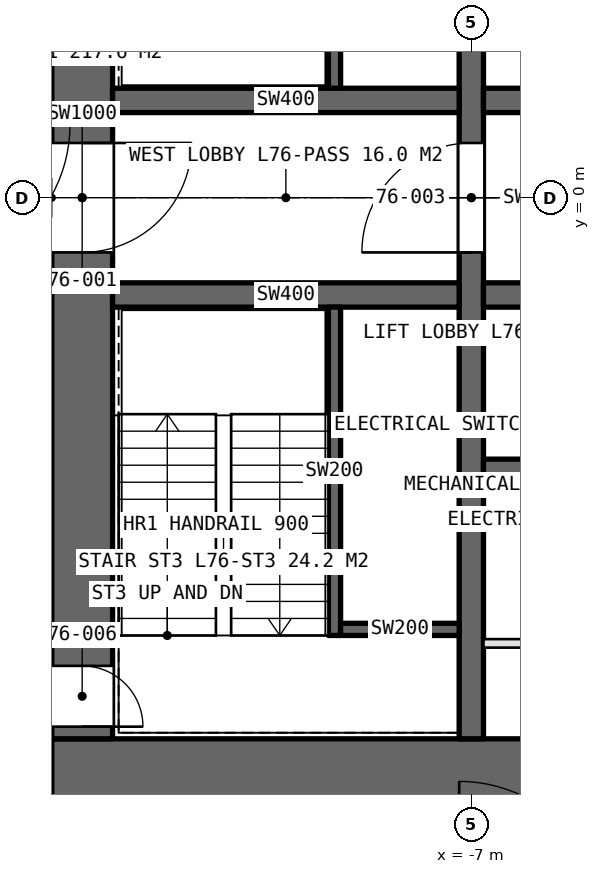
"""IFC4 building model, lengths in metres.
Left out: names, types, materials, properties, quantities, classifications, styles, units other than length and angle.
Written with IfcOpenShell. Run it as: python <this file> out.ifc"""

import sys

from ifc_helpers import new_model, si_unit, direction, frame, frame_2d, origin, place, context, subcontext, project, spatial, rectangle, extrude, element, fill, save


model = new_model("IFC4")
c1 = context("Model", 3, precision=1e-05, world=origin(), true_north=direction((0.0, 1.0)))
c2 = subcontext(c1, "Body", "Model", "MODEL_VIEW")
j1 = project(units=[si_unit("LENGTHUNIT", "METRE"), si_unit("PLANEANGLEUNIT", "RADIAN")], contexts=[c1])
p1 = place(None, origin())
s1 = spatial("IfcSite", under=j1, at=p1, CompositionType="ELEMENT")
p2 = place(p1, origin())
s2 = spatial("IfcBuilding", under=s1, at=p2, CompositionType="ELEMENT")
p3 = place(p2, frame((0.0, 0.0, 339.2)))
s3 = spatial("IfcBuildingStorey", under=s2, at=p3, CompositionType="ELEMENT", Elevation=339.2)
p4 = place(p3, frame((-13.9, -9.4, 0.0), z_axis=(0.0, 0.0, 1.0), x_axis=(1.0, 0.0, 0.0)))
e1 = element("IfcWall", 1, at=p4, inside=s3, PredefinedType="SHEAR", context=c2, shape_type="SweptSolid", body=[
    extrude(rectangle(XDim=27.8, YDim=1.0, at=frame_2d((13.9, 0.0))), origin(), (0.0, 0.0, 1.0), 5.0),
])
p5 = place(p4, frame((13.0, 0.0, 0.0)))
e2 = element("IfcOpeningElement", 2, at=p5, cuts=e1, PredefinedType="OPENING", context=c2, shape_type="SweptSolid", body=[
    extrude(rectangle(XDim=1.8, YDim=2.4, at=frame_2d((0.9, 1.2))), frame((0.0, 0.51, 0.0), z_axis=(0.0, -1.0, 0.0), x_axis=(1.0, 0.0, 0.0)), (0.0, 0.0, 1.0), 1.02),
])
p6 = place(p4, frame((22.95, 0.0, 0.0)))
e3 = element("IfcOpeningElement", 3, at=p6, cuts=e1, PredefinedType="OPENING", context=c2, shape_type="SweptSolid", body=[
    extrude(rectangle(XDim=2.2, YDim=2.7, at=frame_2d((1.1, 1.35))), frame((0.0, 0.51, 0.0), z_axis=(0.0, -1.0, 0.0), x_axis=(1.0, 0.0, 0.0)), (0.0, 0.0, 1.0), 1.02),
])
p7 = place(p3, frame((-13.4, 8.9, 0.0), z_axis=(0.0, 0.0, 1.0), x_axis=(0.0, -1.0, 0.0)))
e4 = element("IfcWall", 4, at=p7, inside=s3, PredefinedType="SHEAR", context=c2, shape_type="SweptSolid", body=[
    extrude(rectangle(XDim=17.8, YDim=1.0, at=frame_2d((8.9, 0.0))), origin(), (0.0, 0.0, 1.0), 5.0),
])
p8 = place(p7, frame((8.0, 0.0, 0.0)))
e5 = element("IfcOpeningElement", 5, at=p8, cuts=e4, PredefinedType="OPENING", context=c2, shape_type="SweptSolid", body=[
    extrude(rectangle(XDim=1.8, YDim=2.4, at=frame_2d((0.9, 1.2))), frame((0.0, 0.51, 0.0), z_axis=(0.0, -1.0, 0.0), x_axis=(1.0, 0.0, 0.0)), (0.0, 0.0, 1.0), 1.02),
])
p9 = place(p7, frame((16.6, 0.0, 0.0)))
e6 = element("IfcOpeningElement", 6, at=p9, cuts=e4, PredefinedType="OPENING", context=c2, shape_type="SweptSolid", body=[
    extrude(rectangle(XDim=1.0, YDim=2.4, at=frame_2d((0.5, 1.2))), frame((0.0, 0.51, 0.0), z_axis=(0.0, -1.0, 0.0), x_axis=(1.0, 0.0, 0.0)), (0.0, 0.0, 1.0), 1.02),
])
p10 = place(p3, frame((-7.0, -8.9, 0.0), z_axis=(0.0, 0.0, 1.0), x_axis=(0.0, 1.0, 0.0)))
e7 = element("IfcWall", 7, at=p10, inside=s3, PredefinedType="SHEAR", context=c2, shape_type="SweptSolid", body=[
    extrude(rectangle(XDim=17.8, YDim=0.4, at=frame_2d((8.9, 0.0))), origin(), (0.0, 0.0, 1.0), 5.0),
])
p11 = place(p10, frame((8.0, 0.0, 0.0)))
e8 = element("IfcOpeningElement", 8, at=p11, cuts=e7, PredefinedType="OPENING", context=c2, shape_type="SweptSolid", body=[
    extrude(rectangle(XDim=1.8, YDim=2.4, at=frame_2d((0.9, 1.2))), frame((0.0, 0.21, 0.0), z_axis=(0.0, -1.0, 0.0), x_axis=(1.0, 0.0, 0.0)), (0.0, 0.0, 1.0), 0.42),
])
p12 = place(p3, frame((-6.8, 1.6, 0.0), z_axis=(0.0, 0.0, 1.0), x_axis=(1.0, 0.0, 0.0)))
e9 = element("IfcWall", 9, at=p12, inside=s3, PredefinedType="SHEAR", context=c2, shape_type="SweptSolid", body=[
    extrude(rectangle(XDim=13.6, YDim=0.4, at=frame_2d((6.8, 0.0))), origin(), (0.0, 0.0, 1.0), 5.0),
])
p13 = place(p12, frame((0.765, 0.0, 0.0)))
e10 = element("IfcOpeningElement", 10, at=p13, cuts=e9, PredefinedType="OPENING", context=c2, shape_type="SweptSolid", body=[
    extrude(rectangle(XDim=1.0, YDim=2.4, at=frame_2d((0.5, 1.2))), frame((0.0, 0.21, 0.0), z_axis=(0.0, -1.0, 0.0), x_axis=(1.0, 0.0, 0.0)), (0.0, 0.0, 1.0), 0.42),
])
p14 = place(p12, frame((3.5, 0.0, 0.0)))
e11 = element("IfcOpeningElement", 11, at=p14, cuts=e9, PredefinedType="OPENING", context=c2, shape_type="SweptSolid", body=[
    extrude(rectangle(XDim=1.0, YDim=2.4, at=frame_2d((0.5, 1.2))), frame((0.0, 0.21, 0.0), z_axis=(0.0, -1.0, 0.0), x_axis=(1.0, 0.0, 0.0)), (0.0, 0.0, 1.0), 0.42),
])
p15 = place(p12, frame((6.3, 0.0, 0.0)))
e12 = element("IfcOpeningElement", 12, at=p15, cuts=e9, PredefinedType="OPENING", context=c2, shape_type="SweptSolid", body=[
    extrude(rectangle(XDim=1.0, YDim=2.4, at=frame_2d((0.5, 1.2))), frame((0.0, 0.21, 0.0), z_axis=(0.0, -1.0, 0.0), x_axis=(1.0, 0.0, 0.0)), (0.0, 0.0, 1.0), 0.42),
])
p16 = place(p12, frame((9.035, 0.0, 0.0)))
e13 = element("IfcOpeningElement", 13, at=p16, cuts=e9, PredefinedType="OPENING", context=c2, shape_type="SweptSolid", body=[
    extrude(rectangle(XDim=1.0, YDim=2.4, at=frame_2d((0.5, 1.2))), frame((0.0, 0.21, 0.0), z_axis=(0.0, -1.0, 0.0), x_axis=(1.0, 0.0, 0.0)), (0.0, 0.0, 1.0), 0.42),
])
p17 = place(p12, frame((11.9, 0.0, 0.0)))
e14 = element("IfcOpeningElement", 14, at=p17, cuts=e9, PredefinedType="OPENING", context=c2, shape_type="SweptSolid", body=[
    extrude(rectangle(XDim=1.0, YDim=2.4, at=frame_2d((0.5, 1.2))), frame((0.0, 0.21, 0.0), z_axis=(0.0, -1.0, 0.0), x_axis=(1.0, 0.0, 0.0)), (0.0, 0.0, 1.0), 0.42),
])
p18 = place(p3, frame((-6.8, -1.6, 0.0), z_axis=(0.0, 0.0, 1.0), x_axis=(1.0, 0.0, 0.0)))
e15 = element("IfcWall", 15, at=p18, inside=s3, PredefinedType="SHEAR", context=c2, shape_type="SweptSolid", body=[
    extrude(rectangle(XDim=13.6, YDim=0.4, at=frame_2d((6.8, 0.0))), origin(), (0.0, 0.0, 1.0), 5.0),
])
p19 = place(p18, frame((0.765, 0.0, 0.0)))
e16 = element("IfcOpeningElement", 16, at=p19, cuts=e15, PredefinedType="OPENING", context=c2, shape_type="SweptSolid", body=[
    extrude(rectangle(XDim=1.0, YDim=2.4, at=frame_2d((0.5, 1.2))), frame((0.0, 0.21, 0.0), z_axis=(0.0, -1.0, 0.0), x_axis=(1.0, 0.0, 0.0)), (0.0, 0.0, 1.0), 0.42),
])
p20 = place(p18, frame((3.5, 0.0, 0.0)))
e17 = element("IfcOpeningElement", 17, at=p20, cuts=e15, PredefinedType="OPENING", context=c2, shape_type="SweptSolid", body=[
    extrude(rectangle(XDim=1.0, YDim=2.4, at=frame_2d((0.5, 1.2))), frame((0.0, 0.21, 0.0), z_axis=(0.0, -1.0, 0.0), x_axis=(1.0, 0.0, 0.0)), (0.0, 0.0, 1.0), 0.42),
])
p21 = place(p18, frame((6.3, 0.0, 0.0)))
e18 = element("IfcOpeningElement", 18, at=p21, cuts=e15, PredefinedType="OPENING", context=c2, shape_type="SweptSolid", body=[
    extrude(rectangle(XDim=1.0, YDim=2.4, at=frame_2d((0.5, 1.2))), frame((0.0, 0.21, 0.0), z_axis=(0.0, -1.0, 0.0), x_axis=(1.0, 0.0, 0.0)), (0.0, 0.0, 1.0), 0.42),
])
p22 = place(p18, frame((9.035, 0.0, 0.0)))
e19 = element("IfcOpeningElement", 19, at=p22, cuts=e15, PredefinedType="OPENING", context=c2, shape_type="SweptSolid", body=[
    extrude(rectangle(XDim=1.0, YDim=2.4, at=frame_2d((0.5, 1.2))), frame((0.0, 0.21, 0.0), z_axis=(0.0, -1.0, 0.0), x_axis=(1.0, 0.0, 0.0)), (0.0, 0.0, 1.0), 0.42),
])
p23 = place(p18, frame((11.9, 0.0, 0.0)))
e20 = element("IfcOpeningElement", 20, at=p23, cuts=e15, PredefinedType="OPENING", context=c2, shape_type="SweptSolid", body=[
    extrude(rectangle(XDim=1.0, YDim=2.4, at=frame_2d((0.5, 1.2))), frame((0.0, 0.21, 0.0), z_axis=(0.0, -1.0, 0.0), x_axis=(1.0, 0.0, 0.0)), (0.0, 0.0, 1.0), 0.42),
])
p24 = place(p3, frame((-6.8, -4.5, 0.0), z_axis=(0.0, 0.0, 1.0), x_axis=(1.0, 0.0, 0.0)))
e21 = element("IfcWall", 21, at=p24, inside=s3, PredefinedType="SHEAR", context=c2, shape_type="SweptSolid", body=[
    extrude(rectangle(XDim=13.6, YDim=0.4, at=frame_2d((6.8, 0.0))), origin(), (0.0, 0.0, 1.0), 5.0),
])
for number, where, z_axis, x_axis in (
    (22, (-12.9, 1.6, 0.0), (0.0, 0.0, 1.0), (1.0, 0.0, 0.0)),
    (23, (-12.9, -1.6, 0.0), (0.0, 0.0, 1.0), (1.0, 0.0, 0.0)),
):
    element("IfcWall", number, at=place(p3, frame(where, z_axis=z_axis, x_axis=x_axis)), inside=s3, PredefinedType="SHEAR", context=c2, shape_type="SweptSolid", body=[
        extrude(rectangle(XDim=5.7, YDim=0.4, at=frame_2d((2.85, 0.0))), origin(), (0.0, 0.0, 1.0), 5.0),
    ])
p25 = place(p3, frame((-6.8, -7.33, 0.0), z_axis=(0.0, 0.0, 1.0), x_axis=(1.0, 0.0, 0.0)))
e24 = element("IfcWall", 24, at=p25, inside=s3, PredefinedType="PARTITIONING", context=c2, shape_type="SweptSolid", body=[
    extrude(rectangle(XDim=13.6, YDim=0.14, at=frame_2d((6.8, 0.0))), origin(), (0.0, 0.0, 1.0), 4.75),
])
p26 = place(p25, frame((3.48, 0.0, 0.0)))
e25 = element("IfcOpeningElement", 25, at=p26, cuts=e24, PredefinedType="OPENING", context=c2, shape_type="SweptSolid", body=[
    extrude(rectangle(XDim=1.0, YDim=2.4, at=frame_2d((0.5, 1.2))), frame((0.0, 0.08, 0.0), z_axis=(0.0, -1.0, 0.0), x_axis=(1.0, 0.0, 0.0)), (0.0, 0.0, 1.0), 0.16),
])
p27 = place(p25, frame((7.98, 0.0, 0.0)))
e26 = element("IfcOpeningElement", 26, at=p27, cuts=e24, PredefinedType="OPENING", context=c2, shape_type="SweptSolid", body=[
    extrude(rectangle(XDim=1.0, YDim=2.4, at=frame_2d((0.5, 1.2))), frame((0.0, 0.08, 0.0), z_axis=(0.0, -1.0, 0.0), x_axis=(1.0, 0.0, 0.0)), (0.0, 0.0, 1.0), 0.16),
])
p28 = place(p25, frame((12.35, 0.0, 0.0)))
e27 = element("IfcOpeningElement", 27, at=p28, cuts=e24, PredefinedType="OPENING", context=c2, shape_type="SweptSolid", body=[
    extrude(rectangle(XDim=1.0, YDim=2.4, at=frame_2d((0.5, 1.2))), frame((0.0, 0.08, 0.0), z_axis=(0.0, -1.0, 0.0), x_axis=(1.0, 0.0, 0.0)), (0.0, 0.0, 1.0), 0.16),
])
for number, where, z_axis, x_axis in (
    (28, (-9.25, 7.2, 0.0), (0.0, 0.0, 1.0), (0.0, -1.0, 0.0)),
    (29, (-9.25, -7.2, 0.0), (0.0, 0.0, 1.0), (0.0, 1.0, 0.0)),
):
    element("IfcWall", number, at=place(p3, frame(where, z_axis=z_axis, x_axis=x_axis)), inside=s3, PredefinedType="SOLIDWALL", context=c2, shape_type="SweptSolid", body=[
        extrude(rectangle(XDim=5.4, YDim=0.2, at=frame_2d((2.7, 0.0))), origin(), (0.0, 0.0, 1.0), 5.0),
    ])
p29 = place(p3, frame((-9.15, -7.1, 0.0), z_axis=(0.0, 0.0, 1.0), x_axis=(1.0, 0.0, 0.0)))
e30 = element("IfcWall", 30, at=p29, inside=s3, PredefinedType="SOLIDWALL", context=c2, shape_type="SweptSolid", body=[
    extrude(rectangle(XDim=1.95, YDim=0.2, at=frame_2d((0.975, 0.0))), origin(), (0.0, 0.0, 1.0), 5.0),
])
p30 = place(p8, origin())
e31 = element("IfcDoor", 31, at=p30, inside=s3, OperationType="DOUBLE_DOOR_SINGLE_SWING", PredefinedType="DOOR", context=c2, shape_type="SweptSolid", body=[
    extrude(rectangle(XDim=1.8, YDim=2.4, at=frame_2d((0.9, 1.2))), frame((0.0, 0.025, 0.0), z_axis=(0.0, -1.0, 0.0), x_axis=(1.0, 0.0, 0.0)), (0.0, 0.0, 1.0), 0.05),
])
fill(e5, e31)
p31 = place(p11, origin())
e32 = element("IfcDoor", 32, at=p31, inside=s3, OperationType="DOUBLE_DOOR_SINGLE_SWING", PredefinedType="DOOR", context=c2, shape_type="SweptSolid", body=[
    extrude(rectangle(XDim=1.8, YDim=2.4, at=frame_2d((0.9, 1.2))), frame((0.0, 0.025, 0.0), z_axis=(0.0, -1.0, 0.0), x_axis=(1.0, 0.0, 0.0)), (0.0, 0.0, 1.0), 0.05),
])
fill(e8, e32)
p32 = place(p9, origin())
e33 = element("IfcDoor", 33, at=p32, inside=s3, OperationType="SINGLE_SWING_RIGHT", PredefinedType="DOOR", context=c2, shape_type="SweptSolid", body=[
    extrude(rectangle(XDim=1.0, YDim=2.4, at=frame_2d((0.5, 1.2))), frame((0.0, 0.025, 0.0), z_axis=(0.0, -1.0, 0.0), x_axis=(1.0, 0.0, 0.0)), (0.0, 0.0, 1.0), 0.05),
])
fill(e6, e33)
save(model, sys.argv[1])
